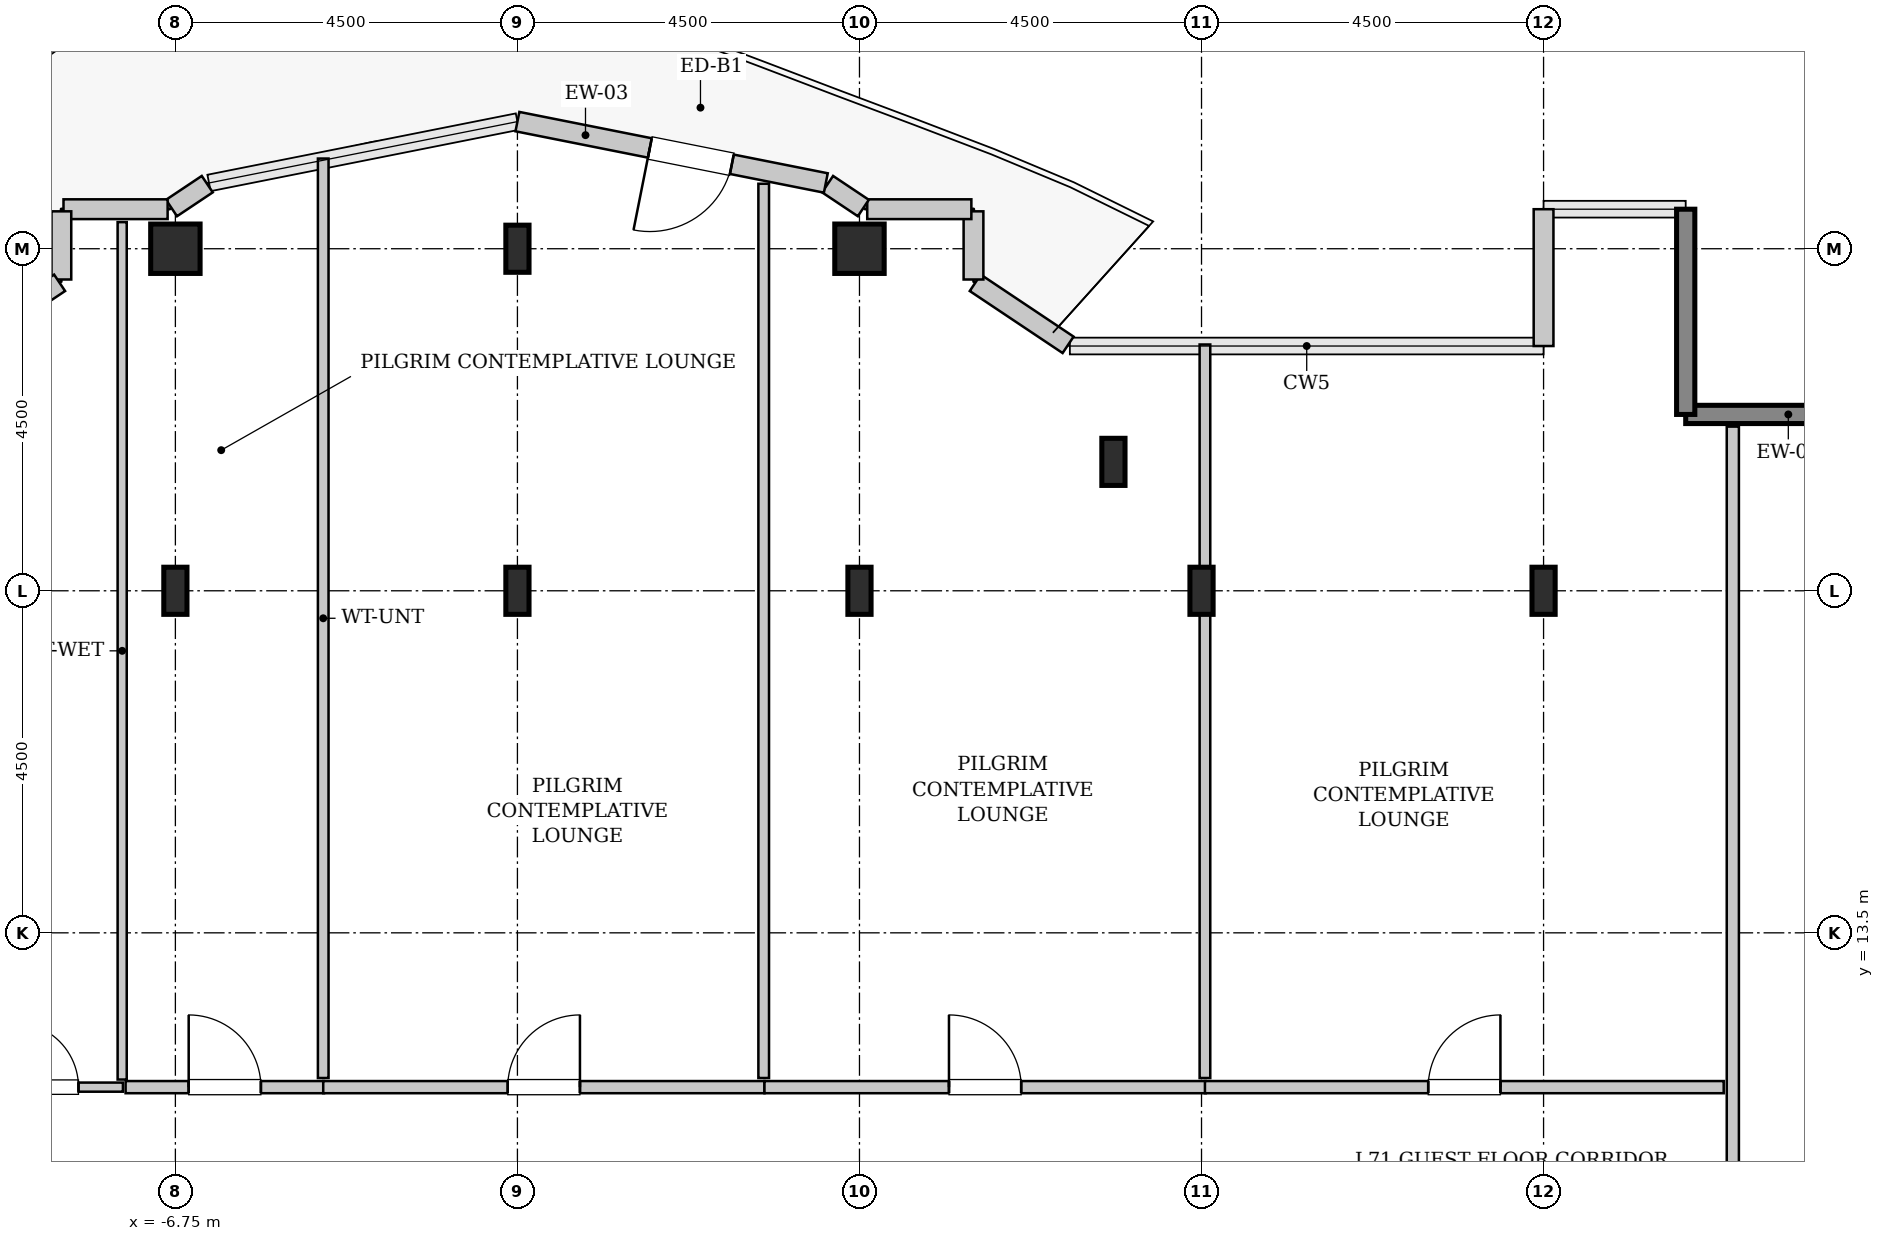
"""IFC4 building model, lengths in metres.
Left out: names, types, materials, properties, quantities, classifications, styles, units other than length and angle.
Written with IfcOpenShell. Run it as: python <this file> out.ifc"""

import sys

from ifc_helpers import new_model, si_unit, direction, frame, frame_2d, origin, origin_2d, place, context, subcontext, project, spatial, rectangle, hollow_rectangle, i_section, extrude, source, transform, mapped, element, fill, save


model = new_model("IFC4")
c1 = context("Model", 3, precision=1e-05, world=origin(), true_north=direction((0.0, 1.0)))
c2 = subcontext(c1, "Body", "Model", "MODEL_VIEW")
j1 = project(units=[si_unit("LENGTHUNIT", "METRE"), si_unit("PLANEANGLEUNIT", "RADIAN")], contexts=[c1])
p1 = place(None, origin())
s1 = spatial("IfcSite", under=j1, at=p1, CompositionType="ELEMENT")
p2 = place(p1, origin())
s2 = spatial("IfcBuilding", under=s1, at=p2, CompositionType="ELEMENT")
p3 = place(p2, frame((0.0, 0.0, 283.6)))
s3 = spatial("IfcBuildingStorey", under=s2, at=p3, CompositionType="ELEMENT", Elevation=283.6)
m1 = source(origin(), c2, "Body", "SweptSolid", [
    extrude(i_section(OverallWidth=0.305, OverallDepth=0.62, WebThickness=0.021, FlangeThickness=0.04, FilletRadius=0.027, at=origin_2d()), origin(), (0.0, 0.0, 1.0), 3.8),
])
p4 = place(p3, frame((-6.75, 18.0, 0.0), z_axis=(0.0, 0.0, 1.0), x_axis=(1.0, 0.0, 0.0)))
e1 = element("IfcColumn", 1, at=p4, inside=s3, PredefinedType="COLUMN", context=c2, shape_type="MappedRepresentation", body=[
    mapped(m1, transform((0.0, 0.0, 0.0), x_axis=(1.0, 0.0, 0.0), y_axis=(0.0, 1.0, 0.0), z_axis=(0.0, 0.0, 1.0), scale=1.0)),
])
m2 = source(origin(), c2, "Body", "SweptSolid", [
    extrude(hollow_rectangle(XDim=0.65, YDim=0.65, WallThickness=0.032, InnerFilletRadius=0.032, OuterFilletRadius=0.064, at=origin_2d()), origin(), (0.0, 0.0, 1.0), 3.8),
])
p5 = place(p3, frame((-6.75, 22.5, 0.0), z_axis=(0.0, 0.0, 1.0), x_axis=(1.0, 0.0, 0.0)))
e2 = element("IfcColumn", 2, at=p5, inside=s3, PredefinedType="COLUMN", context=c2, shape_type="MappedRepresentation", body=[
    mapped(m2, transform((0.0, 0.0, 0.0), x_axis=(1.0, 0.0, 0.0), y_axis=(0.0, 1.0, 0.0), z_axis=(0.0, 0.0, 1.0), scale=1.0)),
])
for number, where, z_axis, x_axis in (
    (3, (-2.25, 18.0, 0.0), (0.0, 0.0, 1.0), (1.0, 0.0, 0.0)),
    (4, (-2.25, 22.5, 0.0), (0.0, 0.0, 1.0), (1.0, 0.0, 0.0)),
    (5, (2.25, 18.0, 0.0), (0.0, 0.0, 1.0), (1.0, 0.0, 0.0)),
):
    element("IfcColumn", number, at=place(p3, frame(where, z_axis=z_axis, x_axis=x_axis)), inside=s3, PredefinedType="COLUMN", context=c2, shape_type="MappedRepresentation", body=[
        mapped(m1, transform((0.0, 0.0, 0.0), x_axis=(1.0, 0.0, 0.0), y_axis=(0.0, 1.0, 0.0), z_axis=(0.0, 0.0, 1.0), scale=1.0)),
    ])
p6 = place(p3, frame((2.25, 22.5, 0.0), z_axis=(0.0, 0.0, 1.0), x_axis=(1.0, 0.0, 0.0)))
e6 = element("IfcColumn", 6, at=p6, inside=s3, PredefinedType="COLUMN", context=c2, shape_type="MappedRepresentation", body=[
    mapped(m2, transform((0.0, 0.0, 0.0), x_axis=(1.0, 0.0, 0.0), y_axis=(0.0, 1.0, 0.0), z_axis=(0.0, 0.0, 1.0), scale=1.0)),
])
for number, where, z_axis, x_axis in (
    (7, (5.591, 19.696, 0.0), (0.0, 0.0, 1.0), (1.0, 0.0, 0.0)),
    (8, (6.75, 18.0, 0.0), (0.0, 0.0, 1.0), (1.0, 0.0, 0.0)),
    (9, (11.25, 18.0, 0.0), (0.0, 0.0, 1.0), (1.0, 0.0, 0.0)),
):
    element("IfcColumn", number, at=place(p3, frame(where, z_axis=z_axis, x_axis=x_axis)), inside=s3, PredefinedType="COLUMN", context=c2, shape_type="MappedRepresentation", body=[
        mapped(m1, transform((0.0, 0.0, 0.0), x_axis=(1.0, 0.0, 0.0), y_axis=(0.0, 1.0, 0.0), z_axis=(0.0, 0.0, 1.0), scale=1.0)),
    ])
m3 = source(origin(), c2, "Body", "SweptSolid", [
    extrude(rectangle(XDim=2.7, YDim=0.24, at=frame_2d((1.35, 0.0))), origin(), (0.0, 0.0, 1.0), 3.55),
])
for number, where, z_axis, x_axis in (
    (10, (15.82, 20.32, 0.0), (0.0, 0.0, 1.0), (-1.0, 0.0, 0.0)),
    (11, (13.12, 20.32, 0.0), (0.0, 0.0, 1.0), (0.0, 1.0, 0.0)),
):
    element("IfcWall", number, at=place(p3, frame(where, z_axis=z_axis, x_axis=x_axis)), inside=s3, PredefinedType="SHEAR", context=c2, shape_type="MappedRepresentation", body=[
        mapped(m3, transform((0.0, 0.0, 0.0), x_axis=(1.0, 0.0, 0.0), y_axis=(0.0, 1.0, 0.0), z_axis=(0.0, 0.0, 1.0), scale=1.0)),
    ])
m4 = source(origin(), c2, "Body", "SweptSolid", [
    extrude(rectangle(XDim=1.8, YDim=0.26, at=frame_2d((0.9, 0.0))), origin(), (0.0, 0.0, 1.0), 3.55),
])
p7 = place(p3, frame((11.25, 23.02, 0.0), z_axis=(0.0, 0.0, 1.0), x_axis=(0.0, -1.0, 0.0)))
e12 = element("IfcWall", 12, at=p7, inside=s3, PredefinedType="SOLIDWALL", context=c2, shape_type="MappedRepresentation", body=[
    mapped(m4, transform((0.0, 0.0, 0.0), x_axis=(1.0, 0.0, 0.0), y_axis=(0.0, 1.0, 0.0), z_axis=(0.0, 0.0, 1.0), scale=1.0)),
])
m5 = source(origin(), c2, "Body", "SweptSolid", [
    extrude(rectangle(XDim=1.469, YDim=0.26, at=frame_2d((0.734, 0.0))), origin(), (0.0, 0.0, 1.0), 3.55),
])
p8 = place(p3, frame((4.995, 21.236, 0.0), z_axis=(0.0, 0.0, 1.0), x_axis=(-0.831461760506, 0.555581983884, 0.0)))
e13 = element("IfcWall", 13, at=p8, inside=s3, PredefinedType="SOLIDWALL", context=c2, shape_type="MappedRepresentation", body=[
    mapped(m5, transform((0.0, 0.0, 0.0), x_axis=(1.0, 0.0, 0.0), y_axis=(0.0, 1.0, 0.0), z_axis=(0.0, 0.0, 1.0), scale=1.0)),
])
m6 = source(origin(), c2, "Body", "SweptSolid", [
    extrude(rectangle(XDim=0.897, YDim=0.26, at=frame_2d((0.448, 0.0))), origin(), (0.0, 0.0, 1.0), 3.55),
])
p9 = place(p3, frame((3.75, 22.095, 0.0), z_axis=(0.0, 0.0, 1.0), x_axis=(0.0, 1.0, 0.0)))
e14 = element("IfcWall", 14, at=p9, inside=s3, PredefinedType="SOLIDWALL", context=c2, shape_type="MappedRepresentation", body=[
    mapped(m6, transform((0.0, 0.0, 0.0), x_axis=(1.0, 0.0, 0.0), y_axis=(0.0, 1.0, 0.0), z_axis=(0.0, 0.0, 1.0), scale=1.0)),
])
m7 = source(origin(), c2, "Body", "SweptSolid", [
    extrude(rectangle(XDim=1.37, YDim=0.26, at=frame_2d((0.685, 0.0))), origin(), (0.0, 0.0, 1.0), 3.55),
])
p10 = place(p3, frame((3.722, 23.02, 0.0), z_axis=(0.0, 0.0, 1.0), x_axis=(-1.0, 0.0, 0.0)))
e15 = element("IfcWall", 15, at=p10, inside=s3, PredefinedType="SOLIDWALL", context=c2, shape_type="MappedRepresentation", body=[
    mapped(m7, transform((0.0, 0.0, 0.0), x_axis=(1.0, 0.0, 0.0), y_axis=(0.0, 1.0, 0.0), z_axis=(0.0, 0.0, 1.0), scale=1.0)),
])
m8 = source(origin(), c2, "Body", "SweptSolid", [
    extrude(rectangle(XDim=0.565, YDim=0.26, at=frame_2d((0.283, 0.0))), origin(), (0.0, 0.0, 1.0), 3.55),
])
p11 = place(p3, frame((2.301, 23.036, 0.0), z_axis=(0.0, 0.0, 1.0), x_axis=(-0.831651492666, 0.555297933317, 0.0)))
e16 = element("IfcWall", 16, at=p11, inside=s3, PredefinedType="SOLIDWALL", context=c2, shape_type="MappedRepresentation", body=[
    mapped(m8, transform((0.0, 0.0, 0.0), x_axis=(1.0, 0.0, 0.0), y_axis=(0.0, 1.0, 0.0), z_axis=(0.0, 0.0, 1.0), scale=1.0)),
])
m9 = source(origin(), c2, "Body", "SweptSolid", [
    extrude(rectangle(XDim=4.137, YDim=0.26, at=frame_2d((2.068, 0.0))), origin(), (0.0, 0.0, 1.0), 3.55),
])
p12 = place(p3, frame((1.807, 23.365, 0.0), z_axis=(0.0, 0.0, 1.0), x_axis=(-0.980782170794, 0.195105954428, 0.0)))
e17 = element("IfcWall", 17, at=p12, inside=s3, PredefinedType="SOLIDWALL", context=c2, shape_type="MappedRepresentation", body=[
    mapped(m9, transform((0.0, 0.0, 0.0), x_axis=(1.0, 0.0, 0.0), y_axis=(0.0, 1.0, 0.0), z_axis=(0.0, 0.0, 1.0), scale=1.0)),
])
p13 = place(p12, frame((1.261, 0.0, 0.0)))
e18 = element("IfcOpeningElement", 18, at=p13, cuts=e17, PredefinedType="OPENING", context=c2, shape_type="SweptSolid", body=[
    extrude(rectangle(XDim=1.1, YDim=2.2, at=frame_2d((0.55, 1.1))), frame((0.0, 0.14, 0.0), z_axis=(0.0, -1.0, 0.0), x_axis=(1.0, 0.0, 0.0)), (0.0, 0.0, 1.0), 0.28),
])
p14 = place(p3, frame((-6.331, 23.35, 0.0), z_axis=(0.0, 0.0, 1.0), x_axis=(-0.831651492666, -0.555297933317, 0.0)))
e19 = element("IfcWall", 19, at=p14, inside=s3, PredefinedType="SOLIDWALL", context=c2, shape_type="MappedRepresentation", body=[
    mapped(m8, transform((0.0, 0.0, 0.0), x_axis=(1.0, 0.0, 0.0), y_axis=(0.0, 1.0, 0.0), z_axis=(0.0, 0.0, 1.0), scale=1.0)),
])
p15 = place(p3, frame((-6.852, 23.02, 0.0), z_axis=(0.0, 0.0, 1.0), x_axis=(-1.0, 0.0, 0.0)))
e20 = element("IfcWall", 20, at=p15, inside=s3, PredefinedType="SOLIDWALL", context=c2, shape_type="MappedRepresentation", body=[
    mapped(m7, transform((0.0, 0.0, 0.0), x_axis=(1.0, 0.0, 0.0), y_axis=(0.0, 1.0, 0.0), z_axis=(0.0, 0.0, 1.0), scale=1.0)),
])
p16 = place(p3, frame((-8.25, 22.992, 0.0), z_axis=(0.0, 0.0, 1.0), x_axis=(0.0, -1.0, 0.0)))
e21 = element("IfcWall", 21, at=p16, inside=s3, PredefinedType="SOLIDWALL", context=c2, shape_type="MappedRepresentation", body=[
    mapped(m6, transform((0.0, 0.0, 0.0), x_axis=(1.0, 0.0, 0.0), y_axis=(0.0, 1.0, 0.0), z_axis=(0.0, 0.0, 1.0), scale=1.0)),
])
p17 = place(p3, frame((-8.273, 22.052, 0.0), z_axis=(0.0, 0.0, 1.0), x_axis=(-0.831461760506, -0.555581983884, 0.0)))
e22 = element("IfcWall", 22, at=p17, inside=s3, PredefinedType="SOLIDWALL", context=c2, shape_type="MappedRepresentation", body=[
    mapped(m5, transform((0.0, 0.0, 0.0), x_axis=(1.0, 0.0, 0.0), y_axis=(0.0, 1.0, 0.0), z_axis=(0.0, 0.0, 1.0), scale=1.0)),
])
m10 = source(origin(), c2, "Body", "SweptSolid", [
    extrude(rectangle(XDim=2.02, YDim=0.12, at=frame_2d((1.01, 0.0))), origin(), (0.0, 0.0, 1.0), 3.535),
])
p18 = place(p3, frame((-9.46, 11.47, 0.0), z_axis=(0.0, 0.0, 1.0), x_axis=(1.0, 0.0, 0.0)))
e23 = element("IfcWall", 23, at=p18, inside=s3, PredefinedType="PLUMBINGWALL", context=c2, shape_type="MappedRepresentation", body=[
    mapped(m10, transform((0.0, 0.0, 0.0), x_axis=(1.0, 0.0, 0.0), y_axis=(0.0, 1.0, 0.0), z_axis=(0.0, 0.0, 1.0), scale=1.0)),
])
p19 = place(p18, frame((0.585, 0.0, 0.0)))
e24 = element("IfcOpeningElement", 24, at=p19, cuts=e23, PredefinedType="OPENING", context=c2, shape_type="SweptSolid", body=[
    extrude(rectangle(XDim=0.85, YDim=2.1, at=frame_2d((0.425, 1.05))), frame((0.0, 0.07, 0.0), z_axis=(0.0, -1.0, 0.0), x_axis=(1.0, 0.0, 0.0)), (0.0, 0.0, 1.0), 0.14),
])
m11 = source(origin(), c2, "Body", "SweptSolid", [
    extrude(rectangle(XDim=11.28, YDim=0.12, at=frame_2d((5.64, 0.0))), origin(), (0.0, 0.0, 1.0), 3.535),
])
p20 = place(p3, frame((-7.45, 11.57, 0.0), z_axis=(0.0, 0.0, 1.0), x_axis=(0.0, 1.0, 0.0)))
e25 = element("IfcWall", 25, at=p20, inside=s3, PredefinedType="PLUMBINGWALL", context=c2, shape_type="MappedRepresentation", body=[
    mapped(m11, transform((0.0, 0.0, 0.0), x_axis=(1.0, 0.0, 0.0), y_axis=(0.0, 1.0, 0.0), z_axis=(0.0, 0.0, 1.0), scale=1.0)),
])
m12 = source(origin(), c2, "Body", "SweptSolid", [
    extrude(rectangle(XDim=13.965, YDim=0.16, at=frame_2d((6.982, 0.0))), origin(), (0.0, 0.0, 1.0), 3.535),
])
p21 = place(p3, frame((13.74, 6.195, 0.0), z_axis=(0.0, 0.0, 1.0), x_axis=(0.0, 1.0, 0.0)))
e26 = element("IfcWall", 26, at=p21, inside=s3, PredefinedType="PARTITIONING", context=c2, shape_type="MappedRepresentation", body=[
    mapped(m12, transform((0.0, 0.0, 0.0), x_axis=(1.0, 0.0, 0.0), y_axis=(0.0, 1.0, 0.0), z_axis=(0.0, 0.0, 1.0), scale=1.0)),
])
p22 = place(p21, frame((2.183, 0.0, 0.0)))
e27 = element("IfcOpeningElement", 27, at=p22, cuts=e26, PredefinedType="OPENING", context=c2, shape_type="SweptSolid", body=[
    extrude(rectangle(XDim=0.95, YDim=2.1, at=frame_2d((0.475, 1.05))), frame((0.0, 0.09, 0.0), z_axis=(0.0, -1.0, 0.0), x_axis=(1.0, 0.0, 0.0)), (0.0, 0.0, 1.0), 0.18),
])
m13 = source(origin(), c2, "Body", "SweptSolid", [
    extrude(rectangle(XDim=2.61, YDim=0.16, at=frame_2d((1.305, 0.0))), origin(), (0.0, 0.0, 1.0), 3.535),
])
p23 = place(p3, frame((-7.405, 11.47, 0.0), z_axis=(0.0, 0.0, 1.0), x_axis=(1.0, 0.0, 0.0)))
e28 = element("IfcWall", 28, at=p23, inside=s3, PredefinedType="PARTITIONING", context=c2, shape_type="MappedRepresentation", body=[
    mapped(m13, transform((0.0, 0.0, 0.0), x_axis=(1.0, 0.0, 0.0), y_axis=(0.0, 1.0, 0.0), z_axis=(0.0, 0.0, 1.0), scale=1.0)),
])
p24 = place(p23, frame((0.83, 0.0, 0.0)))
e29 = element("IfcOpeningElement", 29, at=p24, cuts=e28, PredefinedType="OPENING", context=c2, shape_type="SweptSolid", body=[
    extrude(rectangle(XDim=0.95, YDim=2.1, at=frame_2d((0.475, 1.05))), frame((0.0, 0.09, 0.0), z_axis=(0.0, -1.0, 0.0), x_axis=(1.0, 0.0, 0.0)), (0.0, 0.0, 1.0), 0.18),
])
m14 = source(origin(), c2, "Body", "SweptSolid", [
    extrude(rectangle(XDim=12.096, YDim=0.14, at=frame_2d((6.048, 0.0))), origin(), (0.0, 0.0, 1.0), 3.535),
])
p25 = place(p3, frame((-4.805, 11.59, 0.0), z_axis=(0.0, 0.0, 1.0), x_axis=(0.0, 1.0, 0.0)))
e30 = element("IfcWall", 30, at=p25, inside=s3, PredefinedType="PARTITIONING", context=c2, shape_type="MappedRepresentation", body=[
    mapped(m14, transform((0.0, 0.0, 0.0), x_axis=(1.0, 0.0, 0.0), y_axis=(0.0, 1.0, 0.0), z_axis=(0.0, 0.0, 1.0), scale=1.0)),
])
m15 = source(origin(), c2, "Body", "SweptSolid", [
    extrude(rectangle(XDim=5.805, YDim=0.16, at=frame_2d((2.902, 0.0))), origin(), (0.0, 0.0, 1.0), 3.535),
])
p26 = place(p3, frame((-4.805, 11.47, 0.0), z_axis=(0.0, 0.0, 1.0), x_axis=(1.0, 0.0, 0.0)))
e31 = element("IfcWall", 31, at=p26, inside=s3, PredefinedType="PARTITIONING", context=c2, shape_type="MappedRepresentation", body=[
    mapped(m15, transform((0.0, 0.0, 0.0), x_axis=(1.0, 0.0, 0.0), y_axis=(0.0, 1.0, 0.0), z_axis=(0.0, 0.0, 1.0), scale=1.0)),
])
p27 = place(p26, frame((2.427, 0.0, 0.0)))
e32 = element("IfcOpeningElement", 32, at=p27, cuts=e31, PredefinedType="OPENING", context=c2, shape_type="SweptSolid", body=[
    extrude(rectangle(XDim=0.95, YDim=2.1, at=frame_2d((0.475, 1.05))), frame((0.0, 0.09, 0.0), z_axis=(0.0, -1.0, 0.0), x_axis=(1.0, 0.0, 0.0)), (0.0, 0.0, 1.0), 0.18),
])
m16 = source(origin(), c2, "Body", "SweptSolid", [
    extrude(rectangle(XDim=11.765, YDim=0.14, at=frame_2d((5.882, 0.0))), origin(), (0.0, 0.0, 1.0), 3.535),
])
p28 = place(p3, frame((0.99, 11.59, 0.0), z_axis=(0.0, 0.0, 1.0), x_axis=(0.0, 1.0, 0.0)))
e33 = element("IfcWall", 33, at=p28, inside=s3, PredefinedType="PARTITIONING", context=c2, shape_type="MappedRepresentation", body=[
    mapped(m16, transform((0.0, 0.0, 0.0), x_axis=(1.0, 0.0, 0.0), y_axis=(0.0, 1.0, 0.0), z_axis=(0.0, 0.0, 1.0), scale=1.0)),
])
p29 = place(p3, frame((1.0, 11.47, 0.0), z_axis=(0.0, 0.0, 1.0), x_axis=(1.0, 0.0, 0.0)))
e34 = element("IfcWall", 34, at=p29, inside=s3, PredefinedType="PARTITIONING", context=c2, shape_type="MappedRepresentation", body=[
    mapped(m15, transform((0.0, 0.0, 0.0), x_axis=(1.0, 0.0, 0.0), y_axis=(0.0, 1.0, 0.0), z_axis=(0.0, 0.0, 1.0), scale=1.0)),
])
p30 = place(p29, frame((2.427, 0.0, 0.0)))
e35 = element("IfcOpeningElement", 35, at=p30, cuts=e34, PredefinedType="OPENING", context=c2, shape_type="SweptSolid", body=[
    extrude(rectangle(XDim=0.95, YDim=2.1, at=frame_2d((0.475, 1.05))), frame((0.0, 0.09, 0.0), z_axis=(0.0, -1.0, 0.0), x_axis=(1.0, 0.0, 0.0)), (0.0, 0.0, 1.0), 0.18),
])
m17 = source(origin(), c2, "Body", "SweptSolid", [
    extrude(rectangle(XDim=9.65, YDim=0.14, at=frame_2d((4.825, 0.0))), origin(), (0.0, 0.0, 1.0), 3.535),
])
p31 = place(p3, frame((6.795, 11.59, 0.0), z_axis=(0.0, 0.0, 1.0), x_axis=(0.0, 1.0, 0.0)))
e36 = element("IfcWall", 36, at=p31, inside=s3, PredefinedType="PARTITIONING", context=c2, shape_type="MappedRepresentation", body=[
    mapped(m17, transform((0.0, 0.0, 0.0), x_axis=(1.0, 0.0, 0.0), y_axis=(0.0, 1.0, 0.0), z_axis=(0.0, 0.0, 1.0), scale=1.0)),
])
m18 = source(origin(), c2, "Body", "SweptSolid", [
    extrude(rectangle(XDim=6.825, YDim=0.16, at=frame_2d((3.413, 0.0))), origin(), (0.0, 0.0, 1.0), 3.535),
])
p32 = place(p3, frame((6.795, 11.47, 0.0), z_axis=(0.0, 0.0, 1.0), x_axis=(1.0, 0.0, 0.0)))
e37 = element("IfcWall", 37, at=p32, inside=s3, PredefinedType="PARTITIONING", context=c2, shape_type="MappedRepresentation", body=[
    mapped(m18, transform((0.0, 0.0, 0.0), x_axis=(1.0, 0.0, 0.0), y_axis=(0.0, 1.0, 0.0), z_axis=(0.0, 0.0, 1.0), scale=1.0)),
])
p33 = place(p32, frame((2.938, 0.0, 0.0)))
e38 = element("IfcOpeningElement", 38, at=p33, cuts=e37, PredefinedType="OPENING", context=c2, shape_type="SweptSolid", body=[
    extrude(rectangle(XDim=0.95, YDim=2.1, at=frame_2d((0.475, 1.05))), frame((0.0, 0.09, 0.0), z_axis=(0.0, -1.0, 0.0), x_axis=(1.0, 0.0, 0.0)), (0.0, 0.0, 1.0), 0.18),
])
m19 = source(origin(), c2, "Body", "SweptSolid", [
    extrude(rectangle(XDim=1.1, YDim=2.2, at=frame_2d((0.55, 1.1))), frame((0.0, 0.025, 0.0), z_axis=(0.0, -1.0, 0.0), x_axis=(1.0, 0.0, 0.0)), (0.0, 0.0, 1.0), 0.05),
])
p34 = place(p13, origin())
e39 = element("IfcDoor", 39, at=p34, inside=s3, OperationType="SINGLE_SWING_RIGHT", PredefinedType="DOOR", context=c2, shape_type="MappedRepresentation", body=[
    mapped(m19, transform((0.0, 0.0, 0.0), x_axis=(1.0, 0.0, 0.0), y_axis=(0.0, 1.0, 0.0), z_axis=(0.0, 0.0, 1.0), scale=1.0)),
])
fill(e18, e39)
m20 = source(origin(), c2, "Body", "SweptSolid", [
    extrude(rectangle(XDim=0.85, YDim=2.1, at=frame_2d((0.425, 1.05))), frame((0.0, 0.025, 0.0), z_axis=(0.0, -1.0, 0.0), x_axis=(1.0, 0.0, 0.0)), (0.0, 0.0, 1.0), 0.05),
])
p35 = place(p19, origin())
e40 = element("IfcDoor", 40, at=p35, inside=s3, OperationType="SINGLE_SWING_LEFT", PredefinedType="DOOR", context=c2, shape_type="MappedRepresentation", body=[
    mapped(m20, transform((0.0, 0.0, 0.0), x_axis=(1.0, 0.0, 0.0), y_axis=(0.0, 1.0, 0.0), z_axis=(0.0, 0.0, 1.0), scale=1.0)),
])
fill(e24, e40)
m21 = source(origin(), c2, "Body", "SweptSolid", [
    extrude(rectangle(XDim=0.95, YDim=2.1, at=frame_2d((0.475, 1.05))), frame((0.0, 0.025, 0.0), z_axis=(0.0, -1.0, 0.0), x_axis=(1.0, 0.0, 0.0)), (0.0, 0.0, 1.0), 0.05),
])
p36 = place(p24, origin())
e41 = element("IfcDoor", 41, at=p36, inside=s3, OperationType="SINGLE_SWING_LEFT", PredefinedType="DOOR", context=c2, shape_type="MappedRepresentation", body=[
    mapped(m21, transform((0.0, 0.0, 0.0), x_axis=(1.0, 0.0, 0.0), y_axis=(0.0, 1.0, 0.0), z_axis=(0.0, 0.0, 1.0), scale=1.0)),
])
fill(e29, e41)
p37 = place(p27, origin())
e42 = element("IfcDoor", 42, at=p37, inside=s3, OperationType="SINGLE_SWING_RIGHT", PredefinedType="DOOR", context=c2, shape_type="MappedRepresentation", body=[
    mapped(m21, transform((0.0, 0.0, 0.0), x_axis=(1.0, 0.0, 0.0), y_axis=(0.0, 1.0, 0.0), z_axis=(0.0, 0.0, 1.0), scale=1.0)),
])
fill(e32, e42)
p38 = place(p30, origin())
e43 = element("IfcDoor", 43, at=p38, inside=s3, OperationType="SINGLE_SWING_LEFT", PredefinedType="DOOR", context=c2, shape_type="MappedRepresentation", body=[
    mapped(m21, transform((0.0, 0.0, 0.0), x_axis=(1.0, 0.0, 0.0), y_axis=(0.0, 1.0, 0.0), z_axis=(0.0, 0.0, 1.0), scale=1.0)),
])
fill(e35, e43)
p39 = place(p33, origin())
e44 = element("IfcDoor", 44, at=p39, inside=s3, OperationType="SINGLE_SWING_RIGHT", PredefinedType="DOOR", context=c2, shape_type="MappedRepresentation", body=[
    mapped(m21, transform((0.0, 0.0, 0.0), x_axis=(1.0, 0.0, 0.0), y_axis=(0.0, 1.0, 0.0), z_axis=(0.0, 0.0, 1.0), scale=1.0)),
])
fill(e38, e44)
save(model, sys.argv[1])
